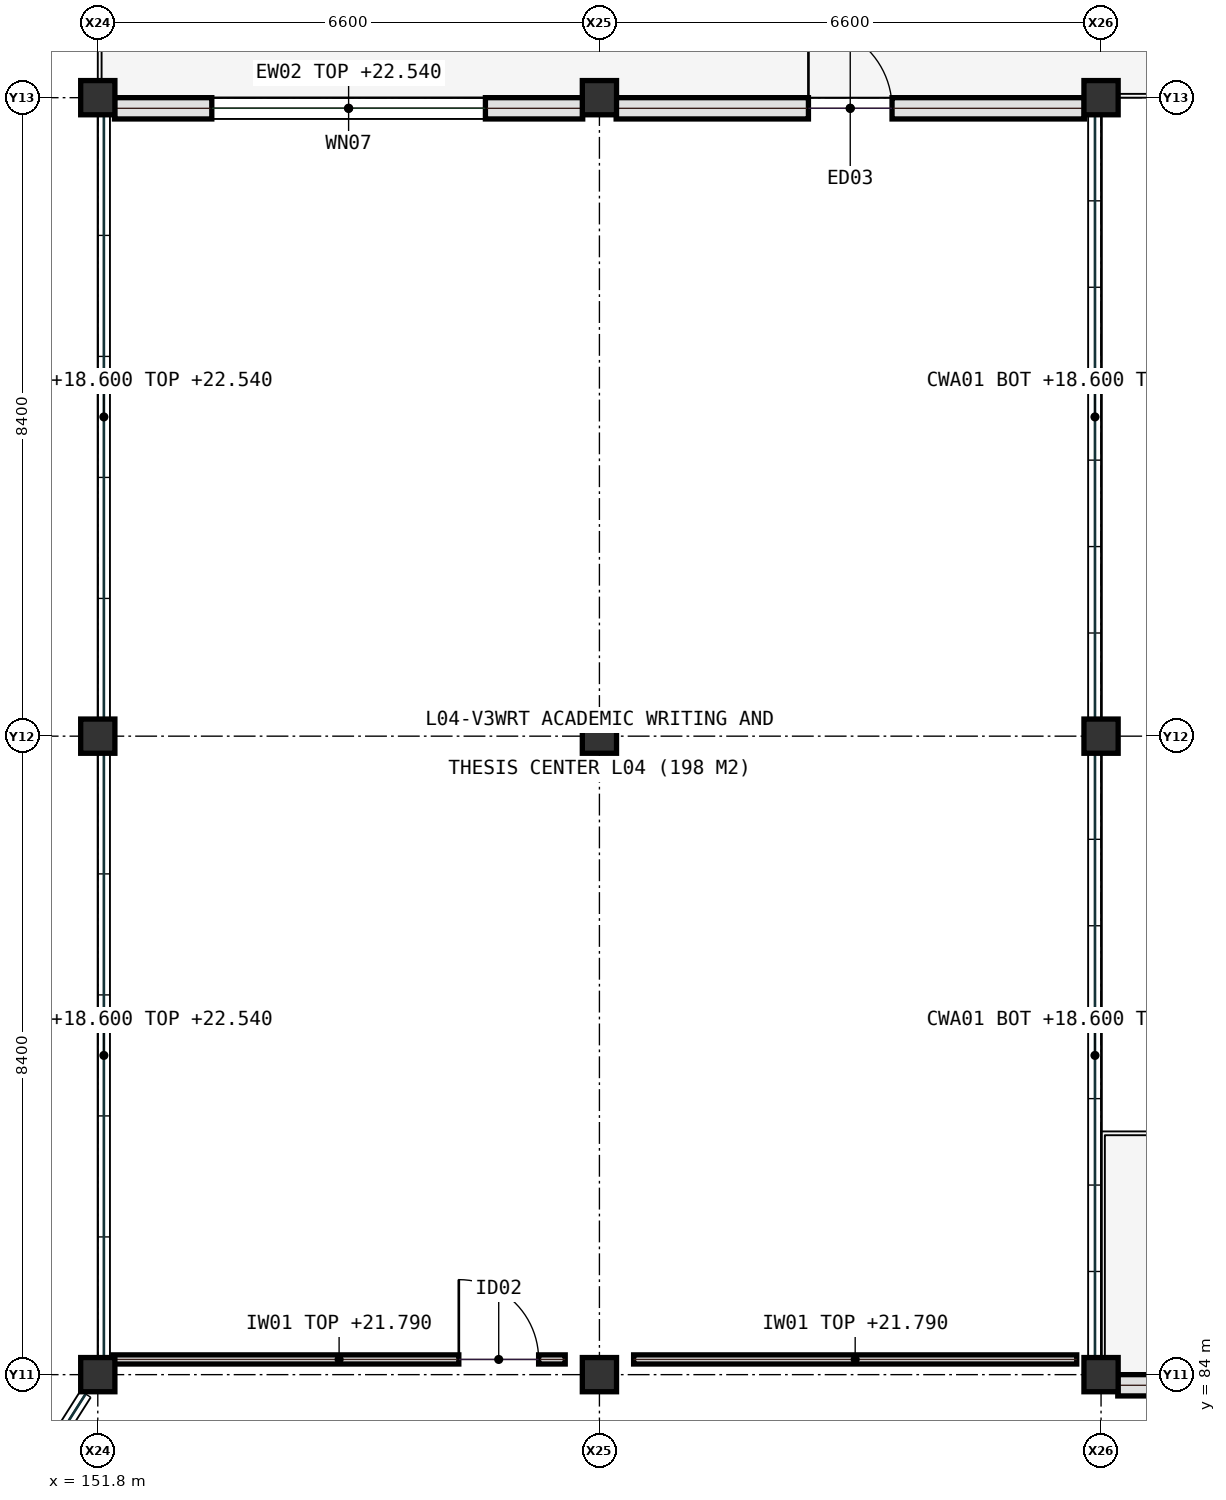
"""IFC4 building model, lengths in metres.
Left out: names, types, materials, properties, quantities, classifications, styles, units other than length and angle.
Written with IfcOpenShell. Run it as: python <this file> out.ifc"""

import sys

from ifc_helpers import new_model, si_unit, direction, frame, frame_2d, origin, origin_2d, place, context, subcontext, project, spatial, rectangle, extrude, element, fill, save


model = new_model("IFC4")
c1 = context("Model", 3, precision=1e-05, world=origin(), true_north=direction((0.0, 1.0)))
c2 = subcontext(c1, "Body", "Model", "MODEL_VIEW")
j1 = project(units=[si_unit("LENGTHUNIT", "METRE"), si_unit("PLANEANGLEUNIT", "RADIAN")], contexts=[c1])
p1 = place(None, origin())
s1 = spatial("IfcSite", under=j1, at=p1, CompositionType="ELEMENT")
p2 = place(p1, origin())
s2 = spatial("IfcBuilding", under=s1, at=p2, CompositionType="ELEMENT")
p3 = place(p2, frame((0.0, 0.0, 18.6)))
s3 = spatial("IfcBuildingStorey", under=s2, at=p3, CompositionType="ELEMENT", Elevation=18.6)
for number, where, z_axis, x_axis in (
    (1, (151.8, 84.0, 0.0), (0.0, 0.0, 1.0), (1.0, 0.0, 0.0)),
    (2, (151.8, 92.4, 0.0), (0.0, 0.0, 1.0), (1.0, 0.0, 0.0)),
    (3, (151.8, 100.8, 0.0), (0.0, 0.0, 1.0), (1.0, 0.0, 0.0)),
):
    element("IfcColumn", number, at=place(p3, frame(where, z_axis=z_axis, x_axis=x_axis)), inside=s3, PredefinedType="COLUMN", context=c2, shape_type="SweptSolid", body=[
        extrude(rectangle(XDim=0.45, YDim=0.45, at=origin_2d()), origin(), (0.0, 0.0, 1.0), 6.98),
    ])
for number, where, z_axis, x_axis in (
    (4, (158.4, 84.0, 0.0), (0.0, 0.0, 1.0), (1.0, 0.0, 0.0)),
    (5, (158.4, 92.4, 0.0), (0.0, 0.0, 1.0), (1.0, 0.0, 0.0)),
    (6, (158.4, 100.8, 0.0), (0.0, 0.0, 1.0), (1.0, 0.0, 0.0)),
):
    element("IfcColumn", number, at=place(p3, frame(where, z_axis=z_axis, x_axis=x_axis)), inside=s3, PredefinedType="COLUMN", context=c2, shape_type="SweptSolid", body=[
        extrude(rectangle(XDim=0.45, YDim=0.45, at=origin_2d()), origin(), (0.0, 0.0, 1.0), 5.495),
    ])
for number, where, z_axis, x_axis in (
    (7, (165.0, 84.0, 0.0), (0.0, 0.0, 1.0), (1.0, 0.0, 0.0)),
    (8, (165.0, 92.4, 0.0), (0.0, 0.0, 1.0), (1.0, 0.0, 0.0)),
    (9, (165.0, 100.8, 0.0), (0.0, 0.0, 1.0), (1.0, 0.0, 0.0)),
):
    element("IfcColumn", number, at=place(p3, frame(where, z_axis=z_axis, x_axis=x_axis)), inside=s3, PredefinedType="COLUMN", context=c2, shape_type="SweptSolid", body=[
        extrude(rectangle(XDim=0.45, YDim=0.45, at=origin_2d()), origin(), (0.0, 0.0, 1.0), 4.01),
    ])
p4 = place(p3, frame((152.0, 84.2, 0.0), z_axis=(0.0, 0.0, 1.0), x_axis=(1.0, 0.0, 0.0)))
e10 = element("IfcWall", 10, at=p4, inside=s3, PredefinedType="PARTITIONING", context=c2, shape_type="SweptSolid", body=[
    extrude(rectangle(XDim=5.95, YDim=0.12, at=frame_2d((2.975, 0.0))), origin(), (0.0, 0.0, 1.0), 3.19),
])
p5 = place(p4, frame((4.55, 0.0, 0.0)))
e11 = element("IfcOpeningElement", 11, at=p5, cuts=e10, PredefinedType="OPENING", context=c2, shape_type="SweptSolid", body=[
    extrude(rectangle(XDim=1.05, YDim=2.15, at=frame_2d((0.525, 1.075))), frame((0.0, 0.07, 0.0), z_axis=(0.0, -1.0, 0.0), x_axis=(1.0, 0.0, 0.0)), (0.0, 0.0, 1.0), 0.14),
])
p6 = place(p3, frame((158.85, 84.2, 0.0), z_axis=(0.0, 0.0, 1.0), x_axis=(1.0, 0.0, 0.0)))
e12 = element("IfcWall", 12, at=p6, inside=s3, PredefinedType="PARTITIONING", context=c2, shape_type="SweptSolid", body=[
    extrude(rectangle(XDim=5.83, YDim=0.12, at=frame_2d((2.915, 0.0))), origin(), (0.0, 0.0, 1.0), 3.19),
])
p7 = place(p3, frame((158.18, 100.66, 0.0), z_axis=(0.0, 0.0, 1.0), x_axis=(-1.0, 0.0, 0.0)))
e13 = element("IfcWall", 13, at=p7, inside=s3, PredefinedType="SOLIDWALL", context=c2, shape_type="SweptSolid", body=[
    extrude(rectangle(XDim=6.16, YDim=0.28, at=frame_2d((3.08, 0.0))), origin(), (0.0, 0.0, 1.0), 3.94),
])
p8 = place(p7, frame((1.28, 0.0, 0.95)))
e14 = element("IfcOpeningElement", 14, at=p8, cuts=e13, PredefinedType="OPENING", context=c2, shape_type="SweptSolid", body=[
    extrude(rectangle(XDim=3.6, YDim=2.0, at=frame_2d((1.8, 1.0))), frame((0.0, 0.15, 0.0), z_axis=(0.0, -1.0, 0.0), x_axis=(1.0, 0.0, 0.0)), (0.0, 0.0, 1.0), 0.3),
])
p9 = place(p3, frame((164.78, 100.66, 0.0), z_axis=(0.0, 0.0, 1.0), x_axis=(-1.0, 0.0, 0.0)))
e15 = element("IfcWall", 15, at=p9, inside=s3, PredefinedType="SOLIDWALL", context=c2, shape_type="SweptSolid", body=[
    extrude(rectangle(XDim=6.16, YDim=0.28, at=frame_2d((3.08, 0.0))), origin(), (0.0, 0.0, 1.0), 3.345),
])
p10 = place(p9, frame((2.53, 0.0, 0.0)))
e16 = element("IfcOpeningElement", 16, at=p10, cuts=e15, PredefinedType="OPENING", context=c2, shape_type="SweptSolid", body=[
    extrude(rectangle(XDim=1.1, YDim=2.2, at=frame_2d((0.55, 1.1))), frame((0.0, 0.15, 0.0), z_axis=(0.0, -1.0, 0.0), x_axis=(1.0, 0.0, 0.0)), (0.0, 0.0, 1.0), 0.3),
])
p11 = place(p3, frame((171.38, 83.86, 0.0), z_axis=(0.0, 0.0, 1.0), x_axis=(-1.0, 0.0, 0.0)))
e17 = element("IfcWall", 17, at=p11, inside=s3, PredefinedType="SOLIDWALL", context=c2, shape_type="SweptSolid", body=[
    extrude(rectangle(XDim=6.16, YDim=0.28, at=frame_2d((3.08, 0.0))), origin(), (0.0, 0.0, 1.0), 3.35),
])
p12 = place(p11, frame((2.53, 0.0, 0.0)))
e18 = element("IfcOpeningElement", 18, at=p12, cuts=e17, PredefinedType="OPENING", context=c2, shape_type="SweptSolid", body=[
    extrude(rectangle(XDim=1.1, YDim=2.2, at=frame_2d((0.55, 1.1))), frame((0.0, 0.15, 0.0), z_axis=(0.0, -1.0, 0.0), x_axis=(1.0, 0.0, 0.0)), (0.0, 0.0, 1.0), 0.3),
])
p13 = place(p5, origin())
e19 = element("IfcDoor", 19, at=p13, inside=s3, OperationType="SINGLE_SWING_LEFT", PredefinedType="DOOR", context=c2, shape_type="SweptSolid", body=[
    extrude(rectangle(XDim=1.05, YDim=2.15, at=frame_2d((0.525, 1.075))), frame((0.0, 0.025, 0.0), z_axis=(0.0, -1.0, 0.0), x_axis=(1.0, 0.0, 0.0)), (0.0, 0.0, 1.0), 0.05),
])
fill(e11, e19)
p14 = place(p8, origin())
e20 = element("IfcWindow", 20, at=p14, inside=s3, PartitioningType="SINGLE_PANEL", PredefinedType="WINDOW", context=c2, shape_type="SweptSolid", body=[
    extrude(rectangle(XDim=3.6, YDim=2.0, at=frame_2d((1.8, 1.0))), frame((0.0, 0.03, 0.0), z_axis=(0.0, -1.0, 0.0), x_axis=(1.0, 0.0, 0.0)), (0.0, 0.0, 1.0), 0.06),
])
fill(e14, e20)
p15 = place(p10, frame((1.1, 0.0, 0.0), z_axis=(0.0, 0.0, 1.0), x_axis=(-1.0, 0.0, 0.0)))
e21 = element("IfcDoor", 21, at=p15, inside=s3, OperationType="SINGLE_SWING_RIGHT", PredefinedType="DOOR", context=c2, shape_type="SweptSolid", body=[
    extrude(rectangle(XDim=1.1, YDim=2.2, at=frame_2d((0.55, 1.1))), frame((0.0, 0.025, 0.0), z_axis=(0.0, -1.0, 0.0), x_axis=(1.0, 0.0, 0.0)), (0.0, 0.0, 1.0), 0.05),
])
fill(e16, e21)
save(model, sys.argv[1])
